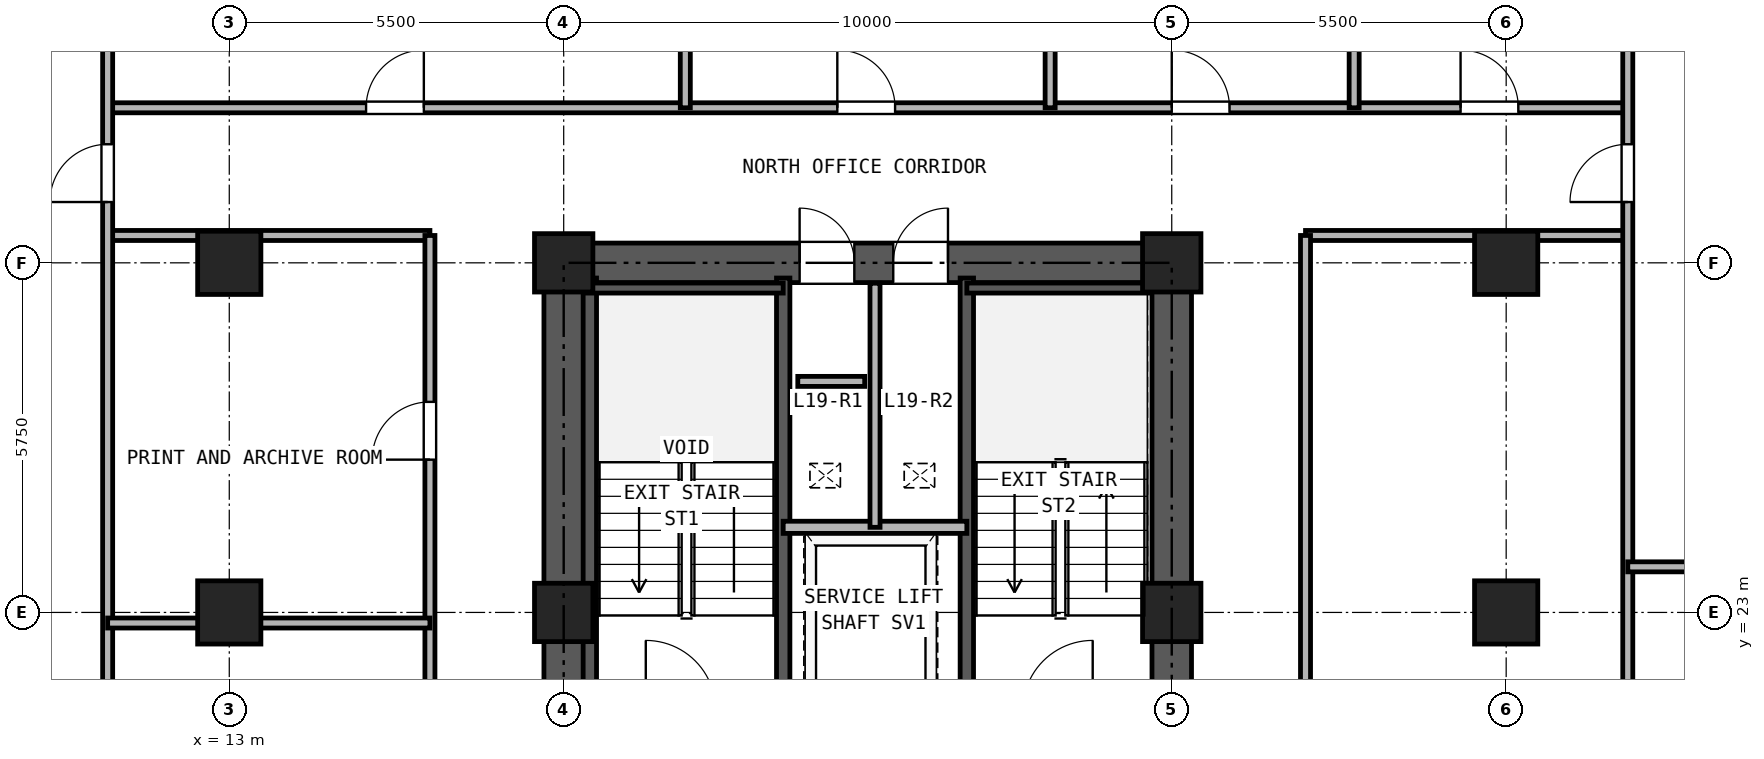
"""IFC4 building model, lengths in metres.
Left out: names, types, materials, properties, quantities, classifications, styles, units other than length and angle.
Written with IfcOpenShell. Run it as: python <this file> out.ifc"""

import sys

from ifc_helpers import new_model, si_unit, direction, frame, frame_2d, origin, origin_2d, place, context, subcontext, project, spatial, rectangle, hollow_rectangle, extrude, source, transform, mapped, element, fill, save


model = new_model("IFC4")
c1 = context("Model", 3, precision=1e-05, world=origin(), true_north=direction((0.0, 1.0)))
c2 = subcontext(c1, "Body", "Model", "MODEL_VIEW")
j1 = project(units=[si_unit("LENGTHUNIT", "METRE"), si_unit("PLANEANGLEUNIT", "RADIAN")], contexts=[c1])
p1 = place(None, origin())
s1 = spatial("IfcSite", under=j1, at=p1, CompositionType="ELEMENT")
p2 = place(p1, origin())
s2 = spatial("IfcBuilding", under=s1, at=p2, CompositionType="ELEMENT")
p3 = place(p2, frame((0.0, 0.0, 72.9)))
s3 = spatial("IfcBuildingStorey", under=s2, at=p3, CompositionType="ELEMENT", Elevation=72.9)
m1 = source(origin(), c2, "Body", "SweptSolid", [
    extrude(hollow_rectangle(XDim=1.04, YDim=1.04, WallThickness=0.065, at=origin_2d()), origin(), (0.0, 0.0, 1.0), 3.24),
])
for number, where, z_axis, x_axis in (
    (1, (13.0, 23.0, 0.0), (0.0, 0.0, 1.0), (1.0, 0.0, 0.0)),
    (2, (13.0, 28.75, 0.0), (0.0, 0.0, 1.0), (1.0, 0.0, 0.0)),
):
    element("IfcColumn", number, at=place(p3, frame(where, z_axis=z_axis, x_axis=x_axis)), inside=s3, PredefinedType="COLUMN", context=c2, shape_type="MappedRepresentation", body=[
        mapped(m1, transform((0.0, 0.0, 0.0), x_axis=(1.0, 0.0, 0.0), y_axis=(0.0, 1.0, 0.0), z_axis=(0.0, 0.0, 1.0), scale=1.0)),
    ])
m2 = source(origin(), c2, "Body", "SweptSolid", [
    extrude(hollow_rectangle(XDim=0.96, YDim=0.96, WallThickness=0.06, at=origin_2d()), origin(), (0.0, 0.0, 1.0), 3.24),
])
for number, where, z_axis, x_axis in (
    (3, (18.5, 23.0, 0.0), (0.0, 0.0, 1.0), (1.0, 0.0, 0.0)),
    (4, (18.5, 28.75, 0.0), (0.0, 0.0, 1.0), (1.0, 0.0, 0.0)),
    (5, (28.5, 23.0, 0.0), (0.0, 0.0, 1.0), (1.0, 0.0, 0.0)),
    (6, (28.5, 28.75, 0.0), (0.0, 0.0, 1.0), (1.0, 0.0, 0.0)),
):
    element("IfcColumn", number, at=place(p3, frame(where, z_axis=z_axis, x_axis=x_axis)), inside=s3, PredefinedType="COLUMN", context=c2, shape_type="MappedRepresentation", body=[
        mapped(m2, transform((0.0, 0.0, 0.0), x_axis=(1.0, 0.0, 0.0), y_axis=(0.0, 1.0, 0.0), z_axis=(0.0, 0.0, 1.0), scale=1.0)),
    ])
for number, where, z_axis, x_axis in (
    (7, (34.0, 23.0, 0.0), (0.0, 0.0, 1.0), (1.0, 0.0, 0.0)),
    (8, (34.0, 28.75, 0.0), (0.0, 0.0, 1.0), (1.0, 0.0, 0.0)),
):
    element("IfcColumn", number, at=place(p3, frame(where, z_axis=z_axis, x_axis=x_axis)), inside=s3, PredefinedType="COLUMN", context=c2, shape_type="MappedRepresentation", body=[
        mapped(m1, transform((0.0, 0.0, 0.0), x_axis=(1.0, 0.0, 0.0), y_axis=(0.0, 1.0, 0.0), z_axis=(0.0, 0.0, 1.0), scale=1.0)),
    ])
p4 = place(p3, frame((18.175, 28.75, 0.0), z_axis=(0.0, 0.0, 1.0), x_axis=(1.0, 0.0, 0.0)))
e9 = element("IfcWall", 9, at=p4, inside=s3, PredefinedType="SHEAR", context=c2, shape_type="SweptSolid", body=[
    extrude(rectangle(XDim=10.65, YDim=0.65, at=frame_2d((5.325, 0.0))), origin(), (0.0, 0.0, 1.0), 3.24),
])
p5 = place(p4, frame((4.205, 0.0, 0.0)))
e10 = element("IfcOpeningElement", 10, at=p5, cuts=e9, PredefinedType="OPENING", context=c2, shape_type="SweptSolid", body=[
    extrude(rectangle(XDim=0.9, YDim=2.05, at=frame_2d((0.45, 1.025))), frame((0.0, 0.335, 0.0), z_axis=(0.0, -1.0, 0.0), x_axis=(1.0, 0.0, 0.0)), (0.0, 0.0, 1.0), 0.67),
])
p6 = place(p4, frame((5.745, 0.0, 0.0)))
e11 = element("IfcOpeningElement", 11, at=p6, cuts=e9, PredefinedType="OPENING", context=c2, shape_type="SweptSolid", body=[
    extrude(rectangle(XDim=0.9, YDim=2.05, at=frame_2d((0.45, 1.025))), frame((0.0, 0.335, 0.0), z_axis=(0.0, -1.0, 0.0), x_axis=(1.0, 0.0, 0.0)), (0.0, 0.0, 1.0), 0.67),
])
p7 = place(p3, frame((18.5, 11.825, 0.0), z_axis=(0.0, 0.0, 1.0), x_axis=(0.0, 1.0, 0.0)))
e12 = element("IfcWall", 12, at=p7, inside=s3, PredefinedType="SHEAR", context=c2, shape_type="SweptSolid", body=[
    extrude(rectangle(XDim=16.6, YDim=0.65, at=frame_2d((8.3, 0.0))), origin(), (0.0, 0.0, 1.0), 3.24),
])
p8 = place(p7, frame((7.325, 0.0, 0.0)))
e13 = element("IfcOpeningElement", 13, at=p8, cuts=e12, PredefinedType="OPENING", context=c2, shape_type="SweptSolid", body=[
    extrude(rectangle(XDim=1.15, YDim=2.2, at=frame_2d((0.575, 1.1))), frame((0.0, 0.335, 0.0), z_axis=(0.0, -1.0, 0.0), x_axis=(1.0, 0.0, 0.0)), (0.0, 0.0, 1.0), 0.67),
])
p9 = place(p3, frame((28.5, 11.825, 0.0), z_axis=(0.0, 0.0, 1.0), x_axis=(0.0, 1.0, 0.0)))
e14 = element("IfcWall", 14, at=p9, inside=s3, PredefinedType="SHEAR", context=c2, shape_type="SweptSolid", body=[
    extrude(rectangle(XDim=16.6, YDim=0.65, at=frame_2d((8.3, 0.0))), origin(), (0.0, 0.0, 1.0), 3.24),
])
p10 = place(p9, frame((7.325, 0.0, 0.0)))
e15 = element("IfcOpeningElement", 15, at=p10, cuts=e14, PredefinedType="OPENING", context=c2, shape_type="SweptSolid", body=[
    extrude(rectangle(XDim=1.15, YDim=2.2, at=frame_2d((0.575, 1.1))), frame((0.0, 0.335, 0.0), z_axis=(0.0, -1.0, 0.0), x_axis=(1.0, 0.0, 0.0)), (0.0, 0.0, 1.0), 0.67),
])
for number, where, z_axis, x_axis in (
    (16, (18.93, 21.39, 0.0), (0.0, 0.0, 1.0), (0.0, 1.0, 0.0)),
    (17, (22.11, 21.39, 0.0), (0.0, 0.0, 1.0), (0.0, 1.0, 0.0)),
    (18, (25.13, 21.39, 0.0), (0.0, 0.0, 1.0), (0.0, 1.0, 0.0)),
):
    element("IfcWall", number, at=place(p3, frame(where, z_axis=z_axis, x_axis=x_axis)), inside=s3, PredefinedType="SOLIDWALL", context=c2, shape_type="SweptSolid", body=[
        extrude(rectangle(XDim=7.11, YDim=0.22, at=frame_2d((3.555, 0.0))), origin(), (0.0, 0.0, 1.0), 3.24),
    ])
p11 = place(p3, frame((18.835, 28.335, 0.0), z_axis=(0.0, 0.0, 1.0), x_axis=(1.0, 0.0, 0.0)))
e19 = element("IfcWall", 19, at=p11, inside=s3, PredefinedType="PARTITIONING", context=c2, shape_type="SweptSolid", body=[
    extrude(rectangle(XDim=3.275, YDim=0.165, at=frame_2d((1.638, 0.0))), origin(), (0.0, 0.0, 1.0), 3.24),
])
p12 = place(p3, frame((25.13, 28.335, 0.0), z_axis=(0.0, 0.0, 1.0), x_axis=(1.0, 0.0, 0.0)))
e20 = element("IfcWall", 20, at=p12, inside=s3, PredefinedType="PARTITIONING", context=c2, shape_type="SweptSolid", body=[
    extrude(rectangle(XDim=3.035, YDim=0.165, at=frame_2d((1.518, 0.0))), origin(), (0.0, 0.0, 1.0), 3.24),
])
p13 = place(p3, frame((22.11, 24.4, 0.0), z_axis=(0.0, 0.0, 1.0), x_axis=(1.0, 0.0, 0.0)))
e21 = element("IfcWall", 21, at=p13, inside=s3, PredefinedType="PARTITIONING", context=c2, shape_type="SweptSolid", body=[
    extrude(rectangle(XDim=3.02, YDim=0.2, at=frame_2d((1.51, 0.0))), origin(), (0.0, 0.0, 1.0), 3.24),
])
p14 = place(p3, frame((23.62, 24.4, 0.0), z_axis=(0.0, 0.0, 1.0), x_axis=(0.0, 1.0, 0.0)))
e22 = element("IfcWall", 22, at=p14, inside=s3, PredefinedType="PARTITIONING", context=c2, shape_type="SweptSolid", body=[
    extrude(rectangle(XDim=4.015, YDim=0.165, at=frame_2d((2.008, 0.0))), origin(), (0.0, 0.0, 1.0), 3.24),
])
p15 = place(p3, frame((11.0, 31.3, 0.0), z_axis=(0.0, 0.0, 1.0), x_axis=(1.0, 0.0, 0.0)))
e23 = element("IfcWall", 23, at=p15, inside=s3, PredefinedType="PARTITIONING", context=c2, shape_type="SweptSolid", body=[
    extrude(rectangle(XDim=25.0, YDim=0.165, at=frame_2d((12.5, 0.0))), origin(), (0.0, 0.0, 1.0), 3.24),
])
p16 = place(p15, frame((4.25, 0.0, 0.0)))
e24 = element("IfcOpeningElement", 24, at=p16, cuts=e23, PredefinedType="OPENING", context=c2, shape_type="SweptSolid", body=[
    extrude(rectangle(XDim=0.95, YDim=2.15, at=frame_2d((0.475, 1.075))), frame((0.0, 0.093, 0.0), z_axis=(0.0, -1.0, 0.0), x_axis=(1.0, 0.0, 0.0)), (0.0, 0.0, 1.0), 0.185),
])
p17 = place(p15, frame((12.0, 0.0, 0.0)))
e25 = element("IfcOpeningElement", 25, at=p17, cuts=e23, PredefinedType="OPENING", context=c2, shape_type="SweptSolid", body=[
    extrude(rectangle(XDim=0.95, YDim=2.15, at=frame_2d((0.475, 1.075))), frame((0.0, 0.093, 0.0), z_axis=(0.0, -1.0, 0.0), x_axis=(1.0, 0.0, 0.0)), (0.0, 0.0, 1.0), 0.185),
])
p18 = place(p15, frame((17.5, 0.0, 0.0)))
e26 = element("IfcOpeningElement", 26, at=p18, cuts=e23, PredefinedType="OPENING", context=c2, shape_type="SweptSolid", body=[
    extrude(rectangle(XDim=0.95, YDim=2.15, at=frame_2d((0.475, 1.075))), frame((0.0, 0.093, 0.0), z_axis=(0.0, -1.0, 0.0), x_axis=(1.0, 0.0, 0.0)), (0.0, 0.0, 1.0), 0.185),
])
p19 = place(p15, frame((22.25, 0.0, 0.0)))
e27 = element("IfcOpeningElement", 27, at=p19, cuts=e23, PredefinedType="OPENING", context=c2, shape_type="SweptSolid", body=[
    extrude(rectangle(XDim=0.95, YDim=2.15, at=frame_2d((0.475, 1.075))), frame((0.0, 0.093, 0.0), z_axis=(0.0, -1.0, 0.0), x_axis=(1.0, 0.0, 0.0)), (0.0, 0.0, 1.0), 0.185),
])
for number, where, z_axis, x_axis in (
    (28, (11.0, 29.2, 0.0), (0.0, 0.0, 1.0), (1.0, 0.0, 0.0)),
    (29, (30.7, 29.2, 0.0), (0.0, 0.0, 1.0), (1.0, 0.0, 0.0)),
):
    element("IfcWall", number, at=place(p3, frame(where, z_axis=z_axis, x_axis=x_axis)), inside=s3, PredefinedType="PARTITIONING", context=c2, shape_type="SweptSolid", body=[
        extrude(rectangle(XDim=5.3, YDim=0.165, at=frame_2d((2.65, 0.0))), origin(), (0.0, 0.0, 1.0), 3.24),
    ])
p20 = place(p3, frame((16.3, 11.1, 0.0), z_axis=(0.0, 0.0, 1.0), x_axis=(0.0, 1.0, 0.0)))
e30 = element("IfcWall", 30, at=p20, inside=s3, PredefinedType="PARTITIONING", context=c2, shape_type="SweptSolid", body=[
    extrude(rectangle(XDim=18.1, YDim=0.165, at=frame_2d((9.05, 0.0))), origin(), (0.0, 0.0, 1.0), 3.24),
])
p21 = place(p20, frame((5.363, 0.0, 0.0)))
e31 = element("IfcOpeningElement", 31, at=p21, cuts=e30, PredefinedType="OPENING", context=c2, shape_type="SweptSolid", body=[
    extrude(rectangle(XDim=0.95, YDim=2.15, at=frame_2d((0.475, 1.075))), frame((0.0, 0.093, 0.0), z_axis=(0.0, -1.0, 0.0), x_axis=(1.0, 0.0, 0.0)), (0.0, 0.0, 1.0), 0.185),
])
p22 = place(p20, frame((14.413, 0.0, 0.0)))
e32 = element("IfcOpeningElement", 32, at=p22, cuts=e30, PredefinedType="OPENING", context=c2, shape_type="SweptSolid", body=[
    extrude(rectangle(XDim=0.95, YDim=2.15, at=frame_2d((0.475, 1.075))), frame((0.0, 0.093, 0.0), z_axis=(0.0, -1.0, 0.0), x_axis=(1.0, 0.0, 0.0)), (0.0, 0.0, 1.0), 0.185),
])
p23 = place(p3, frame((30.7, 11.1, 0.0), z_axis=(0.0, 0.0, 1.0), x_axis=(0.0, 1.0, 0.0)))
e33 = element("IfcWall", 33, at=p23, inside=s3, PredefinedType="PARTITIONING", context=c2, shape_type="SweptSolid", body=[
    extrude(rectangle(XDim=18.1, YDim=0.165, at=frame_2d((9.05, 0.0))), origin(), (0.0, 0.0, 1.0), 3.24),
])
p24 = place(p23, frame((8.55, 0.0, 0.0)))
e34 = element("IfcOpeningElement", 34, at=p24, cuts=e33, PredefinedType="OPENING", context=c2, shape_type="SweptSolid", body=[
    extrude(rectangle(XDim=0.95, YDim=2.15, at=frame_2d((0.475, 1.075))), frame((0.0, 0.093, 0.0), z_axis=(0.0, -1.0, 0.0), x_axis=(1.0, 0.0, 0.0)), (0.0, 0.0, 1.0), 0.185),
])
p25 = place(p3, frame((11.0, 0.16, 0.0), z_axis=(0.0, 0.0, 1.0), x_axis=(0.0, 1.0, 0.0)))
e35 = element("IfcWall", 35, at=p25, inside=s3, PredefinedType="PARTITIONING", context=c2, shape_type="SweptSolid", body=[
    extrude(rectangle(XDim=40.18, YDim=0.165, at=frame_2d((20.09, 0.0))), origin(), (0.0, 0.0, 1.0), 3.24),
])
p26 = place(p25, frame((9.39, 0.0, 0.0)))
e36 = element("IfcOpeningElement", 36, at=p26, cuts=e35, PredefinedType="OPENING", context=c2, shape_type="SweptSolid", body=[
    extrude(rectangle(XDim=0.95, YDim=2.15, at=frame_2d((0.475, 1.075))), frame((0.0, 0.093, 0.0), z_axis=(0.0, -1.0, 0.0), x_axis=(1.0, 0.0, 0.0)), (0.0, 0.0, 1.0), 0.185),
])
p27 = place(p25, frame((29.59, 0.0, 0.0)))
e37 = element("IfcOpeningElement", 37, at=p27, cuts=e35, PredefinedType="OPENING", context=c2, shape_type="SweptSolid", body=[
    extrude(rectangle(XDim=0.95, YDim=2.15, at=frame_2d((0.475, 1.075))), frame((0.0, 0.093, 0.0), z_axis=(0.0, -1.0, 0.0), x_axis=(1.0, 0.0, 0.0)), (0.0, 0.0, 1.0), 0.185),
])
p28 = place(p3, frame((36.0, 0.16, 0.0), z_axis=(0.0, 0.0, 1.0), x_axis=(0.0, 1.0, 0.0)))
e38 = element("IfcWall", 38, at=p28, inside=s3, PredefinedType="PARTITIONING", context=c2, shape_type="SweptSolid", body=[
    extrude(rectangle(XDim=40.18, YDim=0.165, at=frame_2d((20.09, 0.0))), origin(), (0.0, 0.0, 1.0), 3.24),
])
p29 = place(p28, frame((9.39, 0.0, 0.0)))
e39 = element("IfcOpeningElement", 39, at=p29, cuts=e38, PredefinedType="OPENING", context=c2, shape_type="SweptSolid", body=[
    extrude(rectangle(XDim=0.95, YDim=2.15, at=frame_2d((0.475, 1.075))), frame((0.0, 0.093, 0.0), z_axis=(0.0, -1.0, 0.0), x_axis=(1.0, 0.0, 0.0)), (0.0, 0.0, 1.0), 0.185),
])
p30 = place(p28, frame((29.59, 0.0, 0.0)))
e40 = element("IfcOpeningElement", 40, at=p30, cuts=e38, PredefinedType="OPENING", context=c2, shape_type="SweptSolid", body=[
    extrude(rectangle(XDim=0.95, YDim=2.15, at=frame_2d((0.475, 1.075))), frame((0.0, 0.093, 0.0), z_axis=(0.0, -1.0, 0.0), x_axis=(1.0, 0.0, 0.0)), (0.0, 0.0, 1.0), 0.185),
])
for number, where, z_axis, x_axis in (
    (41, (20.5, 31.3, 0.0), (0.0, 0.0, 1.0), (0.0, 1.0, 0.0)),
    (42, (26.5, 31.3, 0.0), (0.0, 0.0, 1.0), (0.0, 1.0, 0.0)),
    (43, (31.5, 31.3, 0.0), (0.0, 0.0, 1.0), (0.0, 1.0, 0.0)),
):
    element("IfcWall", number, at=place(p3, frame(where, z_axis=z_axis, x_axis=x_axis)), inside=s3, PredefinedType="PARTITIONING", context=c2, shape_type="SweptSolid", body=[
        extrude(rectangle(XDim=9.04, YDim=0.165, at=frame_2d((4.52, 0.0))), origin(), (0.0, 0.0, 1.0), 3.24),
    ])
p31 = place(p3, frame((36.0, 23.75, 0.0), z_axis=(0.0, 0.0, 1.0), x_axis=(1.0, 0.0, 0.0)))
e44 = element("IfcWall", 44, at=p31, inside=s3, PredefinedType="PARTITIONING", context=c2, shape_type="SweptSolid", body=[
    extrude(rectangle(XDim=10.84, YDim=0.165, at=frame_2d((5.42, 0.0))), origin(), (0.0, 0.0, 1.0), 3.24),
])
p32 = place(p3, frame((11.0, 22.826, 0.0), z_axis=(0.0, 0.0, 1.0), x_axis=(1.0, 0.0, 0.0)))
e45 = element("IfcWall", 45, at=p32, inside=s3, PredefinedType="PARTITIONING", context=c2, shape_type="SweptSolid", body=[
    extrude(rectangle(XDim=5.3, YDim=0.165, at=frame_2d((2.65, 0.0))), origin(), (0.0, 0.0, 1.0), 2.459),
])
p33 = place(p3, frame((22.35, 26.8, 0.0), z_axis=(0.0, 0.0, 1.0), x_axis=(1.0, 0.0, 0.0)))
e46 = element("IfcWall", 46, at=p33, inside=s3, PredefinedType="PARTITIONING", context=c2, shape_type="SweptSolid", body=[
    extrude(rectangle(XDim=1.1, YDim=0.165, at=frame_2d((0.55, 0.0))), origin(), (0.0, 0.0, 1.0), 3.24),
])
p34 = place(p5, origin())
e47 = element("IfcDoor", 47, at=p34, inside=s3, OperationType="SINGLE_SWING_LEFT", PredefinedType="DOOR", context=c2, shape_type="SweptSolid", body=[
    extrude(rectangle(XDim=0.9, YDim=2.05, at=frame_2d((0.45, 1.025))), frame((0.0, 0.025, 0.0), z_axis=(0.0, -1.0, 0.0), x_axis=(1.0, 0.0, 0.0)), (0.0, 0.0, 1.0), 0.05),
])
fill(e10, e47)
p35 = place(p6, origin())
e48 = element("IfcDoor", 48, at=p35, inside=s3, OperationType="SINGLE_SWING_RIGHT", PredefinedType="DOOR", context=c2, shape_type="SweptSolid", body=[
    extrude(rectangle(XDim=0.9, YDim=2.05, at=frame_2d((0.45, 1.025))), frame((0.0, 0.025, 0.0), z_axis=(0.0, -1.0, 0.0), x_axis=(1.0, 0.0, 0.0)), (0.0, 0.0, 1.0), 0.05),
])
fill(e11, e48)
p36 = place(p16, origin())
e49 = element("IfcDoor", 49, at=p36, inside=s3, OperationType="SINGLE_SWING_RIGHT", PredefinedType="DOOR", context=c2, shape_type="SweptSolid", body=[
    extrude(rectangle(XDim=0.95, YDim=2.15, at=frame_2d((0.475, 1.075))), frame((0.0, 0.025, 0.0), z_axis=(0.0, -1.0, 0.0), x_axis=(1.0, 0.0, 0.0)), (0.0, 0.0, 1.0), 0.05),
])
fill(e24, e49)
p37 = place(p17, origin())
e50 = element("IfcDoor", 50, at=p37, inside=s3, OperationType="SINGLE_SWING_LEFT", PredefinedType="DOOR", context=c2, shape_type="SweptSolid", body=[
    extrude(rectangle(XDim=0.95, YDim=2.15, at=frame_2d((0.475, 1.075))), frame((0.0, 0.025, 0.0), z_axis=(0.0, -1.0, 0.0), x_axis=(1.0, 0.0, 0.0)), (0.0, 0.0, 1.0), 0.05),
])
fill(e25, e50)
p38 = place(p18, origin())
e51 = element("IfcDoor", 51, at=p38, inside=s3, OperationType="SINGLE_SWING_LEFT", PredefinedType="DOOR", context=c2, shape_type="SweptSolid", body=[
    extrude(rectangle(XDim=0.95, YDim=2.15, at=frame_2d((0.475, 1.075))), frame((0.0, 0.025, 0.0), z_axis=(0.0, -1.0, 0.0), x_axis=(1.0, 0.0, 0.0)), (0.0, 0.0, 1.0), 0.05),
])
fill(e26, e51)
p39 = place(p19, origin())
e52 = element("IfcDoor", 52, at=p39, inside=s3, OperationType="SINGLE_SWING_LEFT", PredefinedType="DOOR", context=c2, shape_type="SweptSolid", body=[
    extrude(rectangle(XDim=0.95, YDim=2.15, at=frame_2d((0.475, 1.075))), frame((0.0, 0.025, 0.0), z_axis=(0.0, -1.0, 0.0), x_axis=(1.0, 0.0, 0.0)), (0.0, 0.0, 1.0), 0.05),
])
fill(e27, e52)
p40 = place(p27, frame((0.95, 0.0, 0.0), z_axis=(0.0, 0.0, 1.0), x_axis=(-1.0, 0.0, 0.0)))
e53 = element("IfcDoor", 53, at=p40, inside=s3, OperationType="SINGLE_SWING_LEFT", PredefinedType="DOOR", context=c2, shape_type="SweptSolid", body=[
    extrude(rectangle(XDim=0.95, YDim=2.15, at=frame_2d((0.475, 1.075))), frame((0.0, 0.025, 0.0), z_axis=(0.0, -1.0, 0.0), x_axis=(1.0, 0.0, 0.0)), (0.0, 0.0, 1.0), 0.05),
])
fill(e37, e53)
p41 = place(p30, origin())
e54 = element("IfcDoor", 54, at=p41, inside=s3, OperationType="SINGLE_SWING_LEFT", PredefinedType="DOOR", context=c2, shape_type="SweptSolid", body=[
    extrude(rectangle(XDim=0.95, YDim=2.15, at=frame_2d((0.475, 1.075))), frame((0.0, 0.025, 0.0), z_axis=(0.0, -1.0, 0.0), x_axis=(1.0, 0.0, 0.0)), (0.0, 0.0, 1.0), 0.05),
])
fill(e40, e54)
p42 = place(p22, frame((0.95, 0.0, 0.0), z_axis=(0.0, 0.0, 1.0), x_axis=(-1.0, 0.0, 0.0)))
e55 = element("IfcDoor", 55, at=p42, inside=s3, OperationType="SINGLE_SWING_LEFT", PredefinedType="DOOR", context=c2, shape_type="SweptSolid", body=[
    extrude(rectangle(XDim=0.95, YDim=2.15, at=frame_2d((0.475, 1.075))), frame((0.0, 0.025, 0.0), z_axis=(0.0, -1.0, 0.0), x_axis=(1.0, 0.0, 0.0)), (0.0, 0.0, 1.0), 0.05),
])
fill(e32, e55)
save(model, sys.argv[1])
